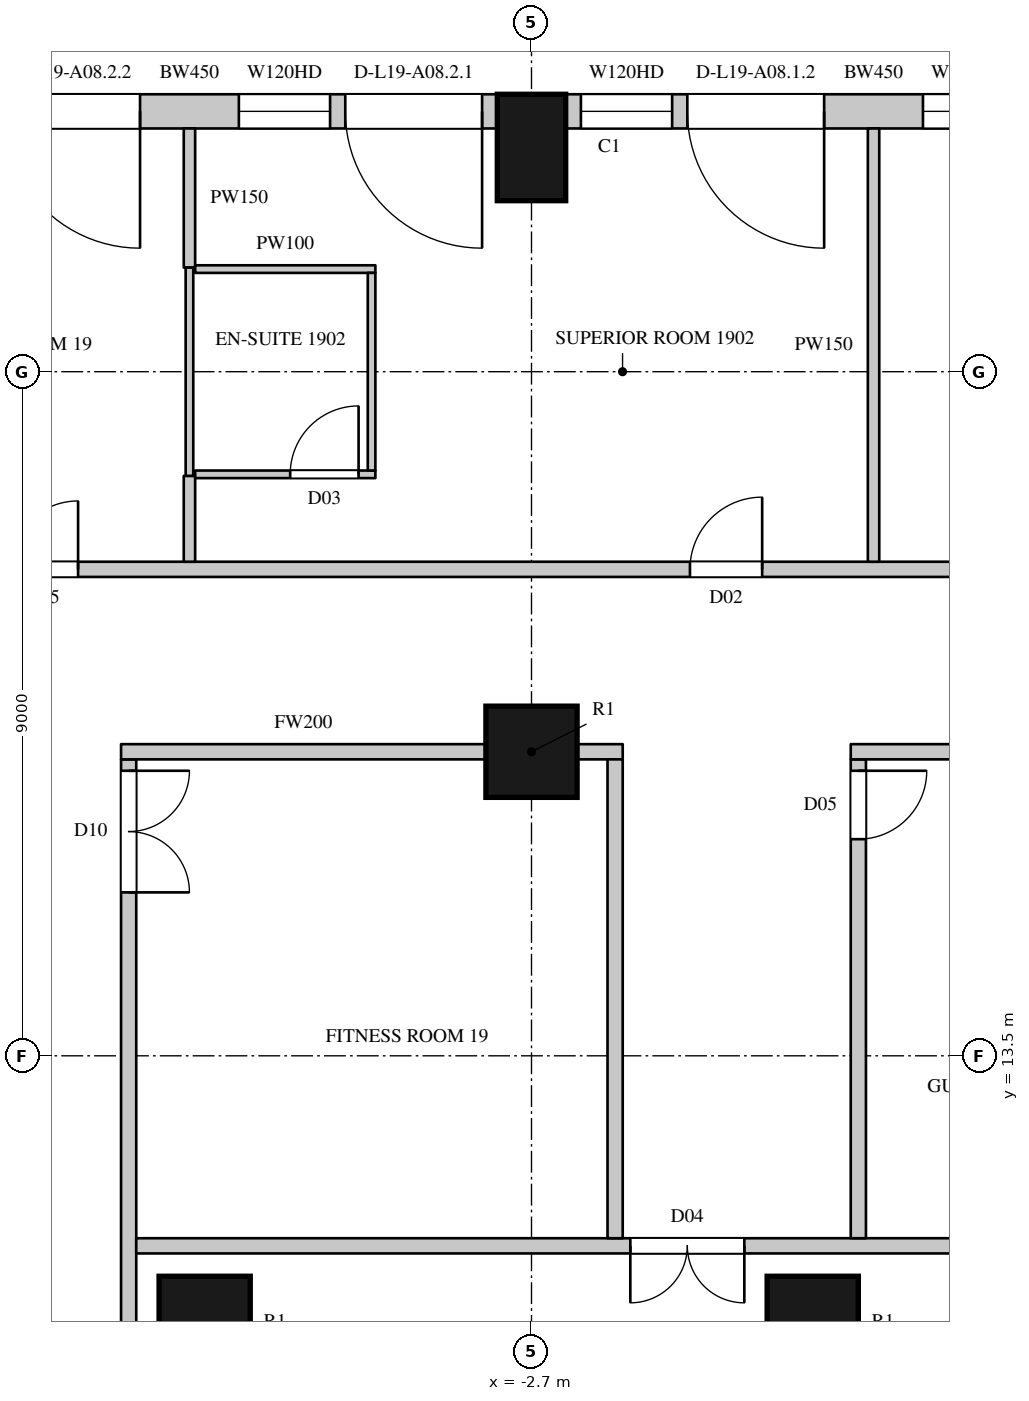
"""IFC4 building model, lengths in metres.
Left out: names, types, materials, properties, quantities, classifications, styles, units other than length and angle.
Written with IfcOpenShell. Run it as: python <this file> out.ifc"""

import sys

from ifc_helpers import new_model, si_unit, direction, frame, frame_2d, origin, origin_2d, place, context, subcontext, project, spatial, rectangle, circle, extrude, element, fill, save


model = new_model("IFC4")
c1 = context("Model", 3, precision=1e-05, world=origin(), true_north=direction((0.0, 1.0)))
c2 = subcontext(c1, "Body", "Model", "MODEL_VIEW")
j1 = project(units=[si_unit("LENGTHUNIT", "METRE"), si_unit("PLANEANGLEUNIT", "RADIAN")], contexts=[c1])
p1 = place(None, origin())
s1 = spatial("IfcSite", under=j1, at=p1, CompositionType="ELEMENT")
p2 = place(p1, origin())
s2 = spatial("IfcBuilding", under=s1, at=p2, CompositionType="ELEMENT")
p3 = place(p2, frame((0.0, 0.0, 98.7)))
s3 = spatial("IfcBuildingStorey", under=s2, at=p3, CompositionType="ELEMENT", Elevation=98.7)
p4 = place(p3, frame((-2.7, 25.45, 0.0), z_axis=(0.0, 0.0, 1.0), x_axis=(-1.0, 0.0, 0.0)))
e1 = element("IfcColumn", 1, at=p4, inside=s3, PredefinedType="COLUMN", context=c2, shape_type="SweptSolid", body=[
    extrude(rectangle(XDim=0.9, YDim=1.4, at=origin_2d()), origin(), (0.0, 0.0, 1.0), 3.6),
])
for number, where, z_axis, x_axis in (
    (2, (-2.7, 17.5, 0.0), (0.0, 0.0, 1.0), (1.0, 0.0, 0.0)),
    (3, (-7.0, 10.0, 0.0), (0.0, 0.0, 1.0), (1.0, 0.0, 0.0)),
    (4, (1.0, 10.0, 0.0), (0.0, 0.0, 1.0), (1.0, 0.0, 0.0)),
):
    element("IfcColumn", number, at=place(p3, frame(where, z_axis=z_axis, x_axis=x_axis)), inside=s3, PredefinedType="COLUMN", context=c2, shape_type="SweptSolid", body=[
        extrude(circle(Radius=0.6, at=origin_2d()), origin(), (0.0, 0.0, 1.0), 3.6),
    ])
p5 = place(p3, frame((5.85, 25.925, 0.0), z_axis=(0.0, 0.0, 1.0), x_axis=(-1.0, 0.0, 0.0)))
e5 = element("IfcWall", 5, at=p5, inside=s3, PredefinedType="SOLIDWALL", context=c2, shape_type="SweptSolid", body=[
    extrude(rectangle(XDim=8.1, YDim=0.45, at=frame_2d((4.05, 0.0))), origin(), (0.0, 0.0, 1.0), 3.3),
])
p6 = place(p5, frame((0.2, 0.0, 0.0)))
e6 = element("IfcOpeningElement", 6, at=p6, cuts=e5, PredefinedType="OPENING", context=c2, shape_type="SweptSolid", body=[
    extrude(rectangle(XDim=1.8, YDim=2.4, at=frame_2d((0.9, 1.2))), frame((0.0, 0.235, 0.0), z_axis=(0.0, -1.0, 0.0), x_axis=(1.0, 0.0, 0.0)), (0.0, 0.0, 1.0), 0.47),
])
p7 = place(p5, frame((2.2, 0.0, 1.05)))
e7 = element("IfcOpeningElement", 7, at=p7, cuts=e5, PredefinedType="OPENING", context=c2, shape_type="SweptSolid", body=[
    extrude(rectangle(XDim=1.2, YDim=2.0, at=frame_2d((0.6, 1.0))), frame((0.0, 0.235, 0.0), z_axis=(0.0, -1.0, 0.0), x_axis=(1.0, 0.0, 0.0)), (0.0, 0.0, 1.0), 0.47),
])
p8 = place(p5, frame((4.7, 0.0, 0.0)))
e8 = element("IfcOpeningElement", 8, at=p8, cuts=e5, PredefinedType="OPENING", context=c2, shape_type="SweptSolid", body=[
    extrude(rectangle(XDim=1.8, YDim=2.4, at=frame_2d((0.9, 1.2))), frame((0.0, 0.235, 0.0), z_axis=(0.0, -1.0, 0.0), x_axis=(1.0, 0.0, 0.0)), (0.0, 0.0, 1.0), 0.47),
])
p9 = place(p5, frame((6.7, 0.0, 1.05)))
e9 = element("IfcOpeningElement", 9, at=p9, cuts=e5, PredefinedType="OPENING", context=c2, shape_type="SweptSolid", body=[
    extrude(rectangle(XDim=1.2, YDim=2.0, at=frame_2d((0.6, 1.0))), frame((0.0, 0.235, 0.0), z_axis=(0.0, -1.0, 0.0), x_axis=(1.0, 0.0, 0.0)), (0.0, 0.0, 1.0), 0.47),
])
p10 = place(p3, frame((-3.15, 25.925, 0.0), z_axis=(0.0, 0.0, 1.0), x_axis=(-1.0, 0.0, 0.0)))
e10 = element("IfcWall", 10, at=p10, inside=s3, PredefinedType="SOLIDWALL", context=c2, shape_type="SweptSolid", body=[
    extrude(rectangle(XDim=8.1, YDim=0.45, at=frame_2d((4.05, 0.0))), origin(), (0.0, 0.0, 1.0), 3.3),
])
p11 = place(p10, frame((0.2, 0.0, 0.0)))
e11 = element("IfcOpeningElement", 11, at=p11, cuts=e10, PredefinedType="OPENING", context=c2, shape_type="SweptSolid", body=[
    extrude(rectangle(XDim=1.8, YDim=2.4, at=frame_2d((0.9, 1.2))), frame((0.0, 0.235, 0.0), z_axis=(0.0, -1.0, 0.0), x_axis=(1.0, 0.0, 0.0)), (0.0, 0.0, 1.0), 0.47),
])
p12 = place(p10, frame((2.2, 0.0, 1.05)))
e12 = element("IfcOpeningElement", 12, at=p12, cuts=e10, PredefinedType="OPENING", context=c2, shape_type="SweptSolid", body=[
    extrude(rectangle(XDim=1.2, YDim=2.0, at=frame_2d((0.6, 1.0))), frame((0.0, 0.235, 0.0), z_axis=(0.0, -1.0, 0.0), x_axis=(1.0, 0.0, 0.0)), (0.0, 0.0, 1.0), 0.47),
])
p13 = place(p10, frame((4.7, 0.0, 0.0)))
e13 = element("IfcOpeningElement", 13, at=p13, cuts=e10, PredefinedType="OPENING", context=c2, shape_type="SweptSolid", body=[
    extrude(rectangle(XDim=1.8, YDim=2.4, at=frame_2d((0.9, 1.2))), frame((0.0, 0.235, 0.0), z_axis=(0.0, -1.0, 0.0), x_axis=(1.0, 0.0, 0.0)), (0.0, 0.0, 1.0), 0.47),
])
p14 = place(p10, frame((6.7, 0.0, 1.05)))
e14 = element("IfcOpeningElement", 14, at=p14, cuts=e10, PredefinedType="OPENING", context=c2, shape_type="SweptSolid", body=[
    extrude(rectangle(XDim=1.2, YDim=2.0, at=frame_2d((0.6, 1.0))), frame((0.0, 0.235, 0.0), z_axis=(0.0, -1.0, 0.0), x_axis=(1.0, 0.0, 0.0)), (0.0, 0.0, 1.0), 0.47),
])
p15 = place(p3, frame((-23.765, 19.9, 0.0), z_axis=(0.0, 0.0, 1.0), x_axis=(1.0, 0.0, 0.0)))
e15 = element("IfcWall", 15, at=p15, inside=s3, PredefinedType="PARTITIONING", context=c2, shape_type="SweptSolid", body=[
    extrude(rectangle(XDim=41.549, YDim=0.2, at=frame_2d((20.774, 0.0))), origin(), (0.0, 0.0, 1.0), 3.3),
])
p16 = place(p15, frame((14.2, 0.0, 0.0)))
e16 = element("IfcOpeningElement", 16, at=p16, cuts=e15, PredefinedType="OPENING", context=c2, shape_type="SweptSolid", body=[
    extrude(rectangle(XDim=0.9, YDim=2.2, at=frame_2d((0.45, 1.1))), frame((0.0, 0.11, 0.0), z_axis=(0.0, -1.0, 0.0), x_axis=(1.0, 0.0, 0.0)), (0.0, 0.0, 1.0), 0.22),
])
p17 = place(p15, frame((27.05, 0.0, 0.0)))
e17 = element("IfcOpeningElement", 17, at=p17, cuts=e15, PredefinedType="OPENING", context=c2, shape_type="SweptSolid", body=[
    extrude(rectangle(XDim=0.9, YDim=2.2, at=frame_2d((0.45, 1.1))), frame((0.0, 0.11, 0.0), z_axis=(0.0, -1.0, 0.0), x_axis=(1.0, 0.0, 0.0)), (0.0, 0.0, 1.0), 0.22),
])
p18 = place(p15, frame((0.75, 0.0, 0.0)))
e18 = element("IfcOpeningElement", 18, at=p18, cuts=e15, PredefinedType="OPENING", context=c2, shape_type="SweptSolid", body=[
    extrude(rectangle(XDim=1.1, YDim=2.4, at=frame_2d((0.55, 1.2))), frame((0.0, 0.11, 0.0), z_axis=(0.0, -1.0, 0.0), x_axis=(1.0, 0.0, 0.0)), (0.0, 0.0, 1.0), 0.22),
])
p19 = place(p15, frame((23.15, 0.0, 0.0)))
e19 = element("IfcOpeningElement", 19, at=p19, cuts=e15, PredefinedType="OPENING", context=c2, shape_type="SweptSolid", body=[
    extrude(rectangle(XDim=0.95, YDim=2.2, at=frame_2d((0.475, 1.1))), frame((0.0, 0.11, 0.0), z_axis=(0.0, -1.0, 0.0), x_axis=(1.0, 0.0, 0.0)), (0.0, 0.0, 1.0), 0.22),
])
p20 = place(p15, frame((34.95, 0.0, 0.0)))
e20 = element("IfcOpeningElement", 20, at=p20, cuts=e15, PredefinedType="OPENING", context=c2, shape_type="SweptSolid", body=[
    extrude(rectangle(XDim=0.95, YDim=2.2, at=frame_2d((0.475, 1.1))), frame((0.0, 0.11, 0.0), z_axis=(0.0, -1.0, 0.0), x_axis=(1.0, 0.0, 0.0)), (0.0, 0.0, 1.0), 0.22),
])
p21 = place(p3, frame((-8.0, -10.9, 0.0), z_axis=(0.0, 0.0, 1.0), x_axis=(0.0, 1.0, 0.0)))
e21 = element("IfcWall", 21, at=p21, inside=s3, PredefinedType="PARTITIONING", context=c2, shape_type="SweptSolid", body=[
    extrude(rectangle(XDim=28.3, YDim=0.2, at=frame_2d((14.15, 0.0))), origin(), (0.0, 0.0, 1.0), 3.3),
])
p22 = place(p21, frame((14.65, 0.0, 0.0)))
e22 = element("IfcOpeningElement", 22, at=p22, cuts=e21, PredefinedType="OPENING", context=c2, shape_type="SweptSolid", body=[
    extrude(rectangle(XDim=1.5, YDim=2.2, at=frame_2d((0.75, 1.1))), frame((0.0, 0.11, 0.0), z_axis=(0.0, -1.0, 0.0), x_axis=(1.0, 0.0, 0.0)), (0.0, 0.0, 1.0), 0.22),
])
p23 = place(p21, frame((26.55, 0.0, 0.0)))
e23 = element("IfcOpeningElement", 23, at=p23, cuts=e21, PredefinedType="OPENING", context=c2, shape_type="SweptSolid", body=[
    extrude(rectangle(XDim=1.6, YDim=2.4, at=frame_2d((0.8, 1.2))), frame((0.0, 0.11, 0.0), z_axis=(0.0, -1.0, 0.0), x_axis=(1.0, 0.0, 0.0)), (0.0, 0.0, 1.0), 0.22),
])
p24 = place(p3, frame((-7.9, 11.0, 0.0), z_axis=(0.0, 0.0, 1.0), x_axis=(1.0, 0.0, 0.0)))
e24 = element("IfcWall", 24, at=p24, inside=s3, PredefinedType="PARTITIONING", context=c2, shape_type="SweptSolid", body=[
    extrude(rectangle(XDim=17.9, YDim=0.2, at=frame_2d((8.95, 0.0))), origin(), (0.0, 0.0, 1.0), 3.3),
])
p25 = place(p24, frame((6.5, 0.0, 0.0)))
e25 = element("IfcOpeningElement", 25, at=p25, cuts=e24, PredefinedType="OPENING", context=c2, shape_type="SweptSolid", body=[
    extrude(rectangle(XDim=1.5, YDim=2.2, at=frame_2d((0.75, 1.1))), frame((0.0, 0.11, 0.0), z_axis=(0.0, -1.0, 0.0), x_axis=(1.0, 0.0, 0.0)), (0.0, 0.0, 1.0), 0.22),
])
p26 = place(p3, frame((-8.1, 17.5, 0.0), z_axis=(0.0, 0.0, 1.0), x_axis=(1.0, 0.0, 0.0)))
e26 = element("IfcWall", 26, at=p26, inside=s3, PredefinedType="PARTITIONING", context=c2, shape_type="SweptSolid", body=[
    extrude(rectangle(XDim=4.8, YDim=0.2, at=frame_2d((2.4, 0.0))), origin(), (0.0, 0.0, 1.0), 2.75),
])
p27 = place(p3, frame((-2.1, 17.5, 0.0), z_axis=(0.0, 0.0, 1.0), x_axis=(1.0, 0.0, 0.0)))
e27 = element("IfcWall", 27, at=p27, inside=s3, PredefinedType="PARTITIONING", context=c2, shape_type="SweptSolid", body=[
    extrude(rectangle(XDim=0.6, YDim=0.2, at=frame_2d((0.3, 0.0))), origin(), (0.0, 0.0, 1.0), 2.75),
])
p28 = place(p3, frame((-1.6, 11.1, 0.0), z_axis=(0.0, 0.0, 1.0), x_axis=(0.0, 1.0, 0.0)))
e28 = element("IfcWall", 28, at=p28, inside=s3, PredefinedType="PARTITIONING", context=c2, shape_type="SweptSolid", body=[
    extrude(rectangle(XDim=6.3, YDim=0.2, at=frame_2d((3.15, 0.0))), origin(), (0.0, 0.0, 1.0), 3.3),
])
p29 = place(p3, frame((1.6, 11.1, 0.0), z_axis=(0.0, 0.0, 1.0), x_axis=(0.0, 1.0, 0.0)))
e29 = element("IfcWall", 29, at=p29, inside=s3, PredefinedType="PARTITIONING", context=c2, shape_type="SweptSolid", body=[
    extrude(rectangle(XDim=6.3, YDim=0.2, at=frame_2d((3.15, 0.0))), origin(), (0.0, 0.0, 1.0), 3.3),
])
p30 = place(p29, frame((5.25, 0.0, 0.0)))
e30 = element("IfcOpeningElement", 30, at=p30, cuts=e29, PredefinedType="OPENING", context=c2, shape_type="SweptSolid", body=[
    extrude(rectangle(XDim=0.9, YDim=2.2, at=frame_2d((0.45, 1.1))), frame((0.0, 0.11, 0.0), z_axis=(0.0, -1.0, 0.0), x_axis=(1.0, 0.0, 0.0)), (0.0, 0.0, 1.0), 0.22),
])
p31 = place(p3, frame((1.5, 17.5, 0.0), z_axis=(0.0, 0.0, 1.0), x_axis=(1.0, 0.0, 0.0)))
e31 = element("IfcWall", 31, at=p31, inside=s3, PredefinedType="PARTITIONING", context=c2, shape_type="SweptSolid", body=[
    extrude(rectangle(XDim=4.2, YDim=0.2, at=frame_2d((2.1, 0.0))), origin(), (0.0, 0.0, 1.0), 2.75),
])
p32 = place(p3, frame((-7.2, 20.0, 0.0), z_axis=(0.0, 0.0, 1.0), x_axis=(0.0, 1.0, 0.0)))
e32 = element("IfcWall", 32, at=p32, inside=s3, PredefinedType="PARTITIONING", context=c2, shape_type="SweptSolid", body=[
    extrude(rectangle(XDim=1.13, YDim=0.15, at=frame_2d((0.565, 0.0))), origin(), (0.0, 0.0, 1.0), 2.65),
])
p33 = place(p3, frame((-7.2, 23.87, 0.0), z_axis=(0.0, 0.0, 1.0), x_axis=(0.0, 1.0, 0.0)))
e33 = element("IfcWall", 33, at=p33, inside=s3, PredefinedType="PARTITIONING", context=c2, shape_type="SweptSolid", body=[
    extrude(rectangle(XDim=1.83, YDim=0.15, at=frame_2d((0.915, 0.0))), origin(), (0.0, 0.0, 1.0), 2.65),
])
p34 = place(p3, frame((1.8, 20.0, 0.0), z_axis=(0.0, 0.0, 1.0), x_axis=(0.0, 1.0, 0.0)))
e34 = element("IfcWall", 34, at=p34, inside=s3, PredefinedType="PARTITIONING", context=c2, shape_type="SweptSolid", body=[
    extrude(rectangle(XDim=5.7, YDim=0.15, at=frame_2d((2.85, 0.0))), origin(), (0.0, 0.0, 1.0), 2.65),
])
p35 = place(p3, frame((-7.2, 21.13, 0.0), z_axis=(0.0, 0.0, 1.0), x_axis=(0.0, 1.0, 0.0)))
e35 = element("IfcWall", 35, at=p35, inside=s3, PredefinedType="PARTITIONING", context=c2, shape_type="SweptSolid", body=[
    extrude(rectangle(XDim=2.74, YDim=0.1, at=frame_2d((1.37, 0.0))), origin(), (0.0, 0.0, 1.0), 2.65),
])
p36 = place(p3, frame((-7.125, 21.15, 0.0), z_axis=(0.0, 0.0, 1.0), x_axis=(1.0, 0.0, 0.0)))
e36 = element("IfcWall", 36, at=p36, inside=s3, PredefinedType="PARTITIONING", context=c2, shape_type="SweptSolid", body=[
    extrude(rectangle(XDim=2.371, YDim=0.1, at=frame_2d((1.186, 0.0))), origin(), (0.0, 0.0, 1.0), 3.3),
])
p37 = place(p36, frame((1.25, 0.0, 0.0)))
e37 = element("IfcOpeningElement", 37, at=p37, cuts=e36, PredefinedType="OPENING", context=c2, shape_type="SweptSolid", body=[
    extrude(rectangle(XDim=0.9, YDim=2.2, at=frame_2d((0.45, 1.1))), frame((0.0, 0.06, 0.0), z_axis=(0.0, -1.0, 0.0), x_axis=(1.0, 0.0, 0.0)), (0.0, 0.0, 1.0), 0.12),
])
p38 = place(p3, frame((-7.125, 23.85, 0.0), z_axis=(0.0, 0.0, 1.0), x_axis=(1.0, 0.0, 0.0)))
e38 = element("IfcWall", 38, at=p38, inside=s3, PredefinedType="PARTITIONING", context=c2, shape_type="SweptSolid", body=[
    extrude(rectangle(XDim=2.371, YDim=0.1, at=frame_2d((1.186, 0.0))), origin(), (0.0, 0.0, 1.0), 3.3),
])
p39 = place(p3, frame((-4.804, 21.2, 0.0), z_axis=(0.0, 0.0, 1.0), x_axis=(0.0, 1.0, 0.0)))
e39 = element("IfcWall", 39, at=p39, inside=s3, PredefinedType="PARTITIONING", context=c2, shape_type="SweptSolid", body=[
    extrude(rectangle(XDim=2.6, YDim=0.1, at=frame_2d((1.3, 0.0))), origin(), (0.0, 0.0, 1.0), 3.3),
])
p40 = place(p7, origin())
e40 = element("IfcWindow", 40, at=p40, inside=s3, PartitioningType="SINGLE_PANEL", PredefinedType="WINDOW", context=c2, shape_type="SweptSolid", body=[
    extrude(rectangle(XDim=1.2, YDim=2.0, at=frame_2d((0.6, 1.0))), frame((0.0, 0.135, 0.0), z_axis=(0.0, -1.0, 0.0), x_axis=(1.0, 0.0, 0.0)), (0.0, 0.0, 1.0), 0.06),
])
fill(e7, e40)
p41 = place(p8, origin())
e41 = element("IfcDoor", 41, at=p41, inside=s3, OperationType="SLIDING_TO_LEFT", PredefinedType="DOOR", context=c2, shape_type="SweptSolid", body=[
    extrude(rectangle(XDim=1.8, YDim=2.4, at=frame_2d((0.9, 1.2))), frame((0.0, 0.13, 0.0), z_axis=(0.0, -1.0, 0.0), x_axis=(1.0, 0.0, 0.0)), (0.0, 0.0, 1.0), 0.05),
])
fill(e8, e41)
p42 = place(p9, origin())
e42 = element("IfcWindow", 42, at=p42, inside=s3, PartitioningType="SINGLE_PANEL", PredefinedType="WINDOW", context=c2, shape_type="SweptSolid", body=[
    extrude(rectangle(XDim=1.2, YDim=2.0, at=frame_2d((0.6, 1.0))), frame((0.0, 0.135, 0.0), z_axis=(0.0, -1.0, 0.0), x_axis=(1.0, 0.0, 0.0)), (0.0, 0.0, 1.0), 0.06),
])
fill(e9, e42)
p43 = place(p11, origin())
e43 = element("IfcDoor", 43, at=p43, inside=s3, OperationType="SLIDING_TO_LEFT", PredefinedType="DOOR", context=c2, shape_type="SweptSolid", body=[
    extrude(rectangle(XDim=1.8, YDim=2.4, at=frame_2d((0.9, 1.2))), frame((0.0, 0.13, 0.0), z_axis=(0.0, -1.0, 0.0), x_axis=(1.0, 0.0, 0.0)), (0.0, 0.0, 1.0), 0.05),
])
fill(e11, e43)
p44 = place(p12, origin())
e44 = element("IfcWindow", 44, at=p44, inside=s3, PartitioningType="SINGLE_PANEL", PredefinedType="WINDOW", context=c2, shape_type="SweptSolid", body=[
    extrude(rectangle(XDim=1.2, YDim=2.0, at=frame_2d((0.6, 1.0))), frame((0.0, 0.135, 0.0), z_axis=(0.0, -1.0, 0.0), x_axis=(1.0, 0.0, 0.0)), (0.0, 0.0, 1.0), 0.06),
])
fill(e12, e44)
p45 = place(p13, origin())
e45 = element("IfcDoor", 45, at=p45, inside=s3, OperationType="SLIDING_TO_LEFT", PredefinedType="DOOR", context=c2, shape_type="SweptSolid", body=[
    extrude(rectangle(XDim=1.8, YDim=2.4, at=frame_2d((0.9, 1.2))), frame((0.0, 0.13, 0.0), z_axis=(0.0, -1.0, 0.0), x_axis=(1.0, 0.0, 0.0)), (0.0, 0.0, 1.0), 0.05),
])
fill(e13, e45)
p46 = place(p25, origin())
e46 = element("IfcDoor", 46, at=p46, inside=s3, OperationType="DOUBLE_DOOR_SINGLE_SWING", PredefinedType="DOOR", context=c2, shape_type="SweptSolid", body=[
    extrude(rectangle(XDim=1.5, YDim=2.2, at=frame_2d((0.75, 1.1))), frame((0.0, 0.025, 0.0), z_axis=(0.0, -1.0, 0.0), x_axis=(1.0, 0.0, 0.0)), (0.0, 0.0, 1.0), 0.05),
])
fill(e25, e46)
p47 = place(p23, origin())
e47 = element("IfcDoor", 47, at=p47, inside=s3, OperationType="DOUBLE_DOOR_SINGLE_SWING", PredefinedType="DOOR", context=c2, shape_type="SweptSolid", body=[
    extrude(rectangle(XDim=1.6, YDim=2.4, at=frame_2d((0.8, 1.2))), frame((0.0, 0.025, 0.0), z_axis=(0.0, -1.0, 0.0), x_axis=(1.0, 0.0, 0.0)), (0.0, 0.0, 1.0), 0.05),
])
fill(e23, e47)
p48 = place(p30, origin())
e48 = element("IfcDoor", 48, at=p48, inside=s3, OperationType="SINGLE_SWING_LEFT", PredefinedType="DOOR", context=c2, shape_type="SweptSolid", body=[
    extrude(rectangle(XDim=0.9, YDim=2.2, at=frame_2d((0.45, 1.1))), frame((0.0, 0.025, 0.0), z_axis=(0.0, -1.0, 0.0), x_axis=(1.0, 0.0, 0.0)), (0.0, 0.0, 1.0), 0.05),
])
fill(e30, e48)
p49 = place(p16, origin())
e49 = element("IfcDoor", 49, at=p49, inside=s3, OperationType="SINGLE_SWING_RIGHT", PredefinedType="DOOR", context=c2, shape_type="SweptSolid", body=[
    extrude(rectangle(XDim=0.9, YDim=2.2, at=frame_2d((0.45, 1.1))), frame((0.0, 0.025, 0.0), z_axis=(0.0, -1.0, 0.0), x_axis=(1.0, 0.0, 0.0)), (0.0, 0.0, 1.0), 0.05),
])
fill(e16, e49)
p50 = place(p19, origin())
e50 = element("IfcDoor", 50, at=p50, inside=s3, OperationType="SINGLE_SWING_RIGHT", PredefinedType="DOOR", context=c2, shape_type="SweptSolid", body=[
    extrude(rectangle(XDim=0.95, YDim=2.2, at=frame_2d((0.475, 1.1))), frame((0.0, 0.025, 0.0), z_axis=(0.0, -1.0, 0.0), x_axis=(1.0, 0.0, 0.0)), (0.0, 0.0, 1.0), 0.05),
])
fill(e19, e50)
p51 = place(p37, origin())
e51 = element("IfcDoor", 51, at=p51, inside=s3, OperationType="SINGLE_SWING_RIGHT", PredefinedType="DOOR", context=c2, shape_type="SweptSolid", body=[
    extrude(rectangle(XDim=0.9, YDim=2.2, at=frame_2d((0.45, 1.1))), frame((0.0, 0.025, 0.0), z_axis=(0.0, -1.0, 0.0), x_axis=(1.0, 0.0, 0.0)), (0.0, 0.0, 1.0), 0.05),
])
fill(e37, e51)
save(model, sys.argv[1])
